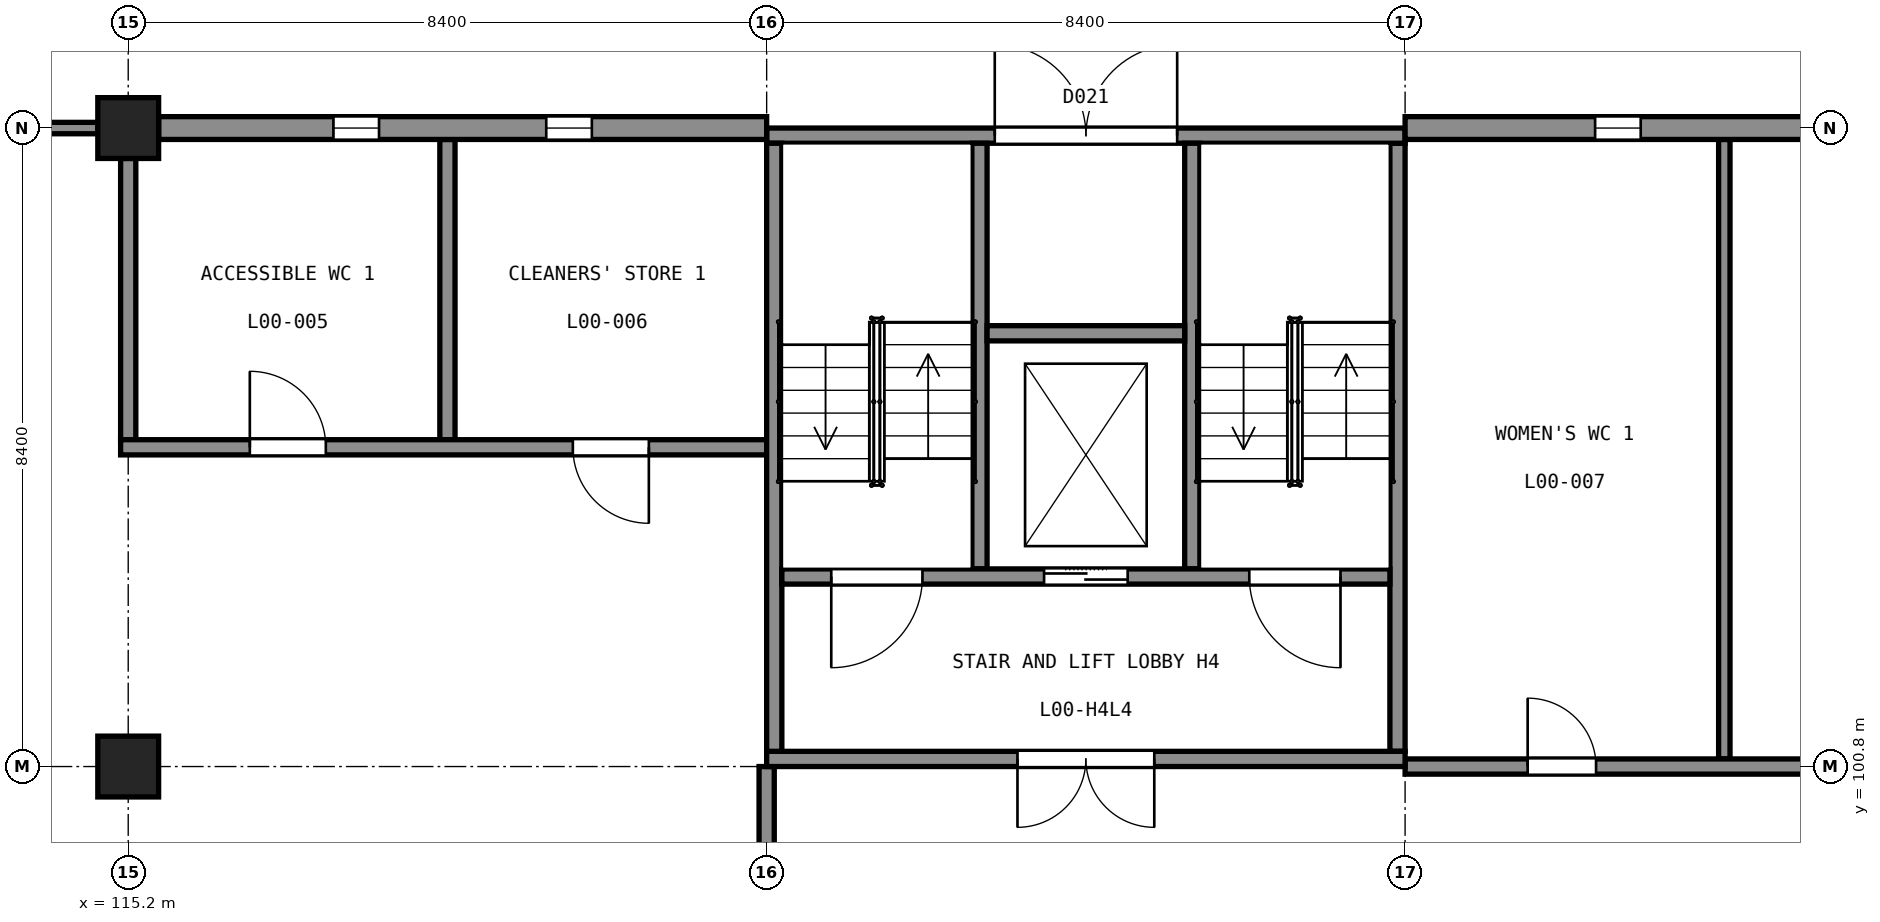
"""IFC4 building model, lengths in metres.
Left out: names, types, materials, properties, quantities, classifications, styles, units other than length and angle.
Written with IfcOpenShell. Run it as: python <this file> out.ifc"""

import sys

from ifc_helpers import new_model, si_unit, direction, frame, frame_2d, origin, origin_2d, place, context, subcontext, project, spatial, rectangle, extrude, element, fill, save


model = new_model("IFC4")
c1 = context("Model", 3, precision=1e-05, world=origin(), true_north=direction((0.0, 1.0)))
c2 = subcontext(c1, "Body", "Model", "MODEL_VIEW")
j1 = project(units=[si_unit("LENGTHUNIT", "METRE"), si_unit("PLANEANGLEUNIT", "RADIAN")], contexts=[c1])
p1 = place(None, origin())
s1 = spatial("IfcSite", under=j1, at=p1, CompositionType="ELEMENT")
p2 = place(p1, origin())
s2 = spatial("IfcBuilding", under=s1, at=p2, CompositionType="ELEMENT")
p3 = place(p2, origin())
s3 = spatial("IfcBuildingStorey", under=s2, at=p3, CompositionType="ELEMENT", Elevation=0.0)
p4 = place(p3, frame((123.6, 100.9, -1.8), z_axis=(0.0, 0.0, 1.0), x_axis=(1.0, 0.0, 0.0)))
e1 = element("IfcWall", 1, at=p4, inside=s3, PredefinedType="SHEAR", context=c2, shape_type="SweptSolid", body=[
    extrude(rectangle(XDim=8.4, YDim=0.2, at=frame_2d((4.2, 0.0))), origin(), (0.0, 0.0, 1.0), 7.3),
])
p5 = place(p4, frame((3.3, 0.0, 1.8)))
e2 = element("IfcOpeningElement", 2, at=p5, cuts=e1, PredefinedType="OPENING", context=c2, shape_type="SweptSolid", body=[
    extrude(rectangle(XDim=1.8, YDim=2.1, at=frame_2d((0.9, 1.05))), frame((0.0, 0.11, 0.0), z_axis=(0.0, -1.0, 0.0), x_axis=(1.0, 0.0, 0.0)), (0.0, 0.0, 1.0), 0.22),
])
p6 = place(p3, frame((123.6, 109.1, -1.8), z_axis=(0.0, 0.0, 1.0), x_axis=(1.0, 0.0, 0.0)))
e3 = element("IfcWall", 3, at=p6, inside=s3, PredefinedType="SHEAR", context=c2, shape_type="SweptSolid", body=[
    extrude(rectangle(XDim=8.4, YDim=0.2, at=frame_2d((4.2, 0.0))), origin(), (0.0, 0.0, 1.0), 7.3),
])
p7 = place(p6, frame((3.001, 0.0, 1.8)))
e4 = element("IfcOpeningElement", 4, at=p7, cuts=e3, PredefinedType="OPENING", context=c2, shape_type="SweptSolid", body=[
    extrude(rectangle(XDim=2.4, YDim=2.1, at=frame_2d((1.2, 1.05))), frame((0.0, 0.11, 0.0), z_axis=(0.0, -1.0, 0.0), x_axis=(1.0, 0.0, 0.0)), (0.0, 0.0, 1.0), 0.22),
])
for number, where, z_axis, x_axis in (
    (5, (123.7, 101.0, -1.8), (0.0, 0.0, 1.0), (0.0, 1.0, 0.0)),
    (6, (131.9, 101.0, -1.8), (0.0, 0.0, 1.0), (0.0, 1.0, 0.0)),
):
    element("IfcWall", number, at=place(p3, frame(where, z_axis=z_axis, x_axis=x_axis)), inside=s3, PredefinedType="SHEAR", context=c2, shape_type="SweptSolid", body=[
        extrude(rectangle(XDim=8.0, YDim=0.2, at=frame_2d((4.0, 0.0))), origin(), (0.0, 0.0, 1.0), 7.3),
    ])
p8 = place(p3, frame((123.8, 103.3, -1.8), z_axis=(0.0, 0.0, 1.0), x_axis=(1.0, 0.0, 0.0)))
e7 = element("IfcWall", 7, at=p8, inside=s3, PredefinedType="SHEAR", context=c2, shape_type="SweptSolid", body=[
    extrude(rectangle(XDim=8.0, YDim=0.2, at=frame_2d((4.0, 0.0))), origin(), (0.0, 0.0, 1.0), 7.3),
])
p9 = place(p8, frame((0.65, 0.0, 1.8)))
e8 = element("IfcOpeningElement", 8, at=p9, cuts=e7, PredefinedType="OPENING", context=c2, shape_type="SweptSolid", body=[
    extrude(rectangle(XDim=1.2, YDim=2.1, at=frame_2d((0.6, 1.05))), frame((0.0, 0.11, 0.0), z_axis=(0.0, -1.0, 0.0), x_axis=(1.0, 0.0, 0.0)), (0.0, 0.0, 1.0), 0.22),
])
p10 = place(p8, frame((6.15, 0.0, 1.8)))
e9 = element("IfcOpeningElement", 9, at=p10, cuts=e7, PredefinedType="OPENING", context=c2, shape_type="SweptSolid", body=[
    extrude(rectangle(XDim=1.2, YDim=2.1, at=frame_2d((0.6, 1.05))), frame((0.0, 0.11, 0.0), z_axis=(0.0, -1.0, 0.0), x_axis=(1.0, 0.0, 0.0)), (0.0, 0.0, 1.0), 0.22),
])
p11 = place(p8, frame((3.45, 0.0, 1.8)))
e10 = element("IfcOpeningElement", 10, at=p11, cuts=e7, PredefinedType="OPENING", context=c2, shape_type="SweptSolid", body=[
    extrude(rectangle(XDim=1.1, YDim=2.1, at=frame_2d((0.55, 1.05))), frame((0.0, 0.11, 0.0), z_axis=(0.0, -1.0, 0.0), x_axis=(1.0, 0.0, 0.0)), (0.0, 0.0, 1.0), 0.22),
])
for number, where, z_axis, x_axis in (
    (11, (126.4, 103.4, -1.8), (0.0, 0.0, 1.0), (0.0, 1.0, 0.0)),
    (12, (129.2, 103.4, -1.8), (0.0, 0.0, 1.0), (0.0, 1.0, 0.0)),
):
    element("IfcWall", number, at=place(p3, frame(where, z_axis=z_axis, x_axis=x_axis)), inside=s3, PredefinedType="SHEAR", context=c2, shape_type="SweptSolid", body=[
        extrude(rectangle(XDim=5.6, YDim=0.2, at=frame_2d((2.8, 0.0))), origin(), (0.0, 0.0, 1.0), 7.3),
    ])
p12 = place(p3, frame((126.5, 106.5, -1.8), z_axis=(0.0, 0.0, 1.0), x_axis=(1.0, 0.0, 0.0)))
e13 = element("IfcWall", 13, at=p12, inside=s3, PredefinedType="SHEAR", context=c2, shape_type="SweptSolid", body=[
    extrude(rectangle(XDim=2.6, YDim=0.2, at=frame_2d((1.3, 0.0))), origin(), (0.0, 0.0, 1.0), 7.3),
])
for number, where, z_axis, x_axis in (
    (14, (115.2, 100.8, -0.3), (0.0, 0.0, 1.0), (1.0, 0.0, 0.0)),
    (15, (115.2, 109.2, -0.3), (0.0, 0.0, 1.0), (1.0, 0.0, 0.0)),
):
    element("IfcColumn", number, at=place(p3, frame(where, z_axis=z_axis, x_axis=x_axis)), inside=s3, PredefinedType="COLUMN", context=c2, shape_type="SweptSolid", body=[
        extrude(rectangle(XDim=0.8, YDim=0.8, at=origin_2d()), origin(), (0.0, 0.0, 1.0), 5.8),
    ])
p13 = place(p3, frame((132.0, 109.2, 0.0), z_axis=(0.0, 0.0, 1.0), x_axis=(1.0, 0.0, 0.0)))
e16 = element("IfcWall", 16, at=p13, inside=s3, PredefinedType="SOLIDWALL", context=c2, shape_type="SweptSolid", body=[
    extrude(rectangle(XDim=8.4, YDim=0.3, at=frame_2d((4.2, 0.0))), origin(), (0.0, 0.0, 1.0), 4.44),
])
p14 = place(p13, frame((2.5, 0.0, 1.5)))
e17 = element("IfcOpeningElement", 17, at=p14, cuts=e16, PredefinedType="OPENING", context=c2, shape_type="SweptSolid", body=[
    extrude(rectangle(XDim=0.6, YDim=2.4, at=frame_2d((0.3, 1.2))), frame((0.0, 0.16, 0.0), z_axis=(0.0, -1.0, 0.0), x_axis=(1.0, 0.0, 0.0)), (0.0, 0.0, 1.0), 0.32),
])
p15 = place(p13, frame((5.3, 0.0, 1.5)))
e18 = element("IfcOpeningElement", 18, at=p15, cuts=e16, PredefinedType="OPENING", context=c2, shape_type="SweptSolid", body=[
    extrude(rectangle(XDim=0.6, YDim=2.4, at=frame_2d((0.3, 1.2))), frame((0.0, 0.16, 0.0), z_axis=(0.0, -1.0, 0.0), x_axis=(1.0, 0.0, 0.0)), (0.0, 0.0, 1.0), 0.32),
])
p16 = place(p3, frame((115.6, 109.2, 0.0), z_axis=(0.0, 0.0, 1.0), x_axis=(1.0, 0.0, 0.0)))
e19 = element("IfcWall", 19, at=p16, inside=s3, PredefinedType="SOLIDWALL", context=c2, shape_type="SweptSolid", body=[
    extrude(rectangle(XDim=8.0, YDim=0.3, at=frame_2d((4.0, 0.0))), origin(), (0.0, 0.0, 1.0), 4.44),
])
p17 = place(p16, frame((2.3, 0.0, 1.5)))
e20 = element("IfcOpeningElement", 20, at=p17, cuts=e19, PredefinedType="OPENING", context=c2, shape_type="SweptSolid", body=[
    extrude(rectangle(XDim=0.6, YDim=2.4, at=frame_2d((0.3, 1.2))), frame((0.0, 0.16, 0.0), z_axis=(0.0, -1.0, 0.0), x_axis=(1.0, 0.0, 0.0)), (0.0, 0.0, 1.0), 0.32),
])
p18 = place(p16, frame((5.1, 0.0, 1.5)))
e21 = element("IfcOpeningElement", 21, at=p18, cuts=e19, PredefinedType="OPENING", context=c2, shape_type="SweptSolid", body=[
    extrude(rectangle(XDim=0.6, YDim=2.4, at=frame_2d((0.3, 1.2))), frame((0.0, 0.16, 0.0), z_axis=(0.0, -1.0, 0.0), x_axis=(1.0, 0.0, 0.0)), (0.0, 0.0, 1.0), 0.32),
])
p19 = place(p3, frame((107.2, 109.2, 0.0), z_axis=(0.0, 0.0, 1.0), x_axis=(1.0, 0.0, 0.0)))
e22 = element("IfcWall", 22, at=p19, inside=s3, PredefinedType="ELEMENTEDWALL", context=c2, shape_type="SweptSolid", body=[
    extrude(rectangle(XDim=7.6, YDim=0.15, at=frame_2d((3.8, 0.0))), origin(), (0.0, 0.0, 1.0), 4.44),
])
p20 = place(p19, frame((0.8, 0.0, 0.0)))
e23 = element("IfcOpeningElement", 23, at=p20, cuts=e22, PredefinedType="OPENING", context=c2, shape_type="SweptSolid", body=[
    extrude(rectangle(XDim=2.0, YDim=2.4, at=frame_2d((1.0, 1.2))), frame((0.0, 0.085, 0.0), z_axis=(0.0, -1.0, 0.0), x_axis=(1.0, 0.0, 0.0)), (0.0, 0.0, 1.0), 0.17),
])
p21 = place(p19, frame((0.8, 0.0, 2.6)))
e24 = element("IfcOpeningElement", 24, at=p21, cuts=e22, PredefinedType="OPENING", context=c2, shape_type="SweptSolid", body=[
    extrude(rectangle(XDim=2.0, YDim=1.74, at=frame_2d((1.0, 0.87))), frame((0.0, 0.085, 0.0), z_axis=(0.0, -1.0, 0.0), x_axis=(1.0, 0.0, 0.0)), (0.0, 0.0, 1.0), 0.17),
])
p22 = place(p19, frame((2.8, 0.0, 0.0)))
e25 = element("IfcOpeningElement", 25, at=p22, cuts=e22, PredefinedType="OPENING", context=c2, shape_type="SweptSolid", body=[
    extrude(rectangle(XDim=2.0, YDim=2.4, at=frame_2d((1.0, 1.2))), frame((0.0, 0.085, 0.0), z_axis=(0.0, -1.0, 0.0), x_axis=(1.0, 0.0, 0.0)), (0.0, 0.0, 1.0), 0.17),
])
p23 = place(p19, frame((2.8, 0.0, 2.6)))
e26 = element("IfcOpeningElement", 26, at=p23, cuts=e22, PredefinedType="OPENING", context=c2, shape_type="SweptSolid", body=[
    extrude(rectangle(XDim=2.0, YDim=1.74, at=frame_2d((1.0, 0.87))), frame((0.0, 0.085, 0.0), z_axis=(0.0, -1.0, 0.0), x_axis=(1.0, 0.0, 0.0)), (0.0, 0.0, 1.0), 0.17),
])
p24 = place(p19, frame((4.8, 0.0, 0.0)))
e27 = element("IfcOpeningElement", 27, at=p24, cuts=e22, PredefinedType="OPENING", context=c2, shape_type="SweptSolid", body=[
    extrude(rectangle(XDim=2.0, YDim=2.4, at=frame_2d((1.0, 1.2))), frame((0.0, 0.085, 0.0), z_axis=(0.0, -1.0, 0.0), x_axis=(1.0, 0.0, 0.0)), (0.0, 0.0, 1.0), 0.17),
])
p25 = place(p19, frame((4.8, 0.0, 2.6)))
e28 = element("IfcOpeningElement", 28, at=p25, cuts=e22, PredefinedType="OPENING", context=c2, shape_type="SweptSolid", body=[
    extrude(rectangle(XDim=2.0, YDim=1.74, at=frame_2d((1.0, 0.87))), frame((0.0, 0.085, 0.0), z_axis=(0.0, -1.0, 0.0), x_axis=(1.0, 0.0, 0.0)), (0.0, 0.0, 1.0), 0.17),
])
p26 = place(p3, frame((119.4, 105.1, 0.0), z_axis=(0.0, 0.0, 1.0), x_axis=(0.0, 1.0, 0.0)))
e29 = element("IfcWall", 29, at=p26, inside=s3, PredefinedType="PARTITIONING", context=c2, shape_type="SweptSolid", body=[
    extrude(rectangle(XDim=3.95, YDim=0.2, at=frame_2d((1.975, 0.0))), origin(), (0.0, 0.0, 1.0), 4.4),
])
p27 = place(p3, frame((115.2, 105.1, 0.0), z_axis=(0.0, 0.0, 1.0), x_axis=(0.0, 1.0, 0.0)))
e30 = element("IfcWall", 30, at=p27, inside=s3, PredefinedType="PARTITIONING", context=c2, shape_type="SweptSolid", body=[
    extrude(rectangle(XDim=3.7, YDim=0.2, at=frame_2d((1.85, 0.0))), origin(), (0.0, 0.0, 1.0), 4.4),
])
p28 = place(p3, frame((115.1, 105.0, 0.0), z_axis=(0.0, 0.0, 1.0), x_axis=(1.0, 0.0, 0.0)))
e31 = element("IfcWall", 31, at=p28, inside=s3, PredefinedType="PARTITIONING", context=c2, shape_type="SweptSolid", body=[
    extrude(rectangle(XDim=8.5, YDim=0.2, at=frame_2d((4.25, 0.0))), origin(), (0.0, 0.0, 1.0), 4.4),
])
p29 = place(p28, frame((1.7, 0.0, 0.0)))
e32 = element("IfcOpeningElement", 32, at=p29, cuts=e31, PredefinedType="OPENING", context=c2, shape_type="SweptSolid", body=[
    extrude(rectangle(XDim=1.0, YDim=2.1, at=frame_2d((0.5, 1.05))), frame((0.0, 0.11, 0.0), z_axis=(0.0, -1.0, 0.0), x_axis=(1.0, 0.0, 0.0)), (0.0, 0.0, 1.0), 0.22),
])
p30 = place(p28, frame((5.95, 0.0, 0.0)))
e33 = element("IfcOpeningElement", 33, at=p30, cuts=e31, PredefinedType="OPENING", context=c2, shape_type="SweptSolid", body=[
    extrude(rectangle(XDim=1.0, YDim=2.1, at=frame_2d((0.5, 1.05))), frame((0.0, 0.11, 0.0), z_axis=(0.0, -1.0, 0.0), x_axis=(1.0, 0.0, 0.0)), (0.0, 0.0, 1.0), 0.22),
])
p31 = place(p3, frame((136.2, 100.9, 0.0), z_axis=(0.0, 0.0, 1.0), x_axis=(0.0, 1.0, 0.0)))
e34 = element("IfcWall", 34, at=p31, inside=s3, PredefinedType="PARTITIONING", context=c2, shape_type="SweptSolid", body=[
    extrude(rectangle(XDim=8.15, YDim=0.15, at=frame_2d((4.075, 0.0))), origin(), (0.0, 0.0, 1.0), 4.4),
])
p32 = place(p3, frame((132.0, 100.8, 0.0), z_axis=(0.0, 0.0, 1.0), x_axis=(1.0, 0.0, 0.0)))
e35 = element("IfcWall", 35, at=p32, inside=s3, PredefinedType="PARTITIONING", context=c2, shape_type="SweptSolid", body=[
    extrude(rectangle(XDim=8.4, YDim=0.2, at=frame_2d((4.2, 0.0))), origin(), (0.0, 0.0, 1.0), 4.4),
])
p33 = place(p32, frame((1.613, 0.0, 0.0)))
e36 = element("IfcOpeningElement", 36, at=p33, cuts=e35, PredefinedType="OPENING", context=c2, shape_type="SweptSolid", body=[
    extrude(rectangle(XDim=0.9, YDim=2.1, at=frame_2d((0.45, 1.05))), frame((0.0, 0.11, 0.0), z_axis=(0.0, -1.0, 0.0), x_axis=(1.0, 0.0, 0.0)), (0.0, 0.0, 1.0), 0.22),
])
p34 = place(p32, frame((5.887, 0.0, 0.0)))
e37 = element("IfcOpeningElement", 37, at=p34, cuts=e35, PredefinedType="OPENING", context=c2, shape_type="SweptSolid", body=[
    extrude(rectangle(XDim=0.9, YDim=2.1, at=frame_2d((0.45, 1.05))), frame((0.0, 0.11, 0.0), z_axis=(0.0, -1.0, 0.0), x_axis=(1.0, 0.0, 0.0)), (0.0, 0.0, 1.0), 0.22),
])
p35 = place(p3, frame((123.6, 92.8, 0.0), z_axis=(0.0, 0.0, 1.0), x_axis=(0.0, 1.0, 0.0)))
e38 = element("IfcWall", 38, at=p35, inside=s3, PredefinedType="PARTITIONING", context=c2, shape_type="SweptSolid", body=[
    extrude(rectangle(XDim=8.0, YDim=0.2, at=frame_2d((4.0, 0.0))), origin(), (0.0, 0.0, 1.0), 4.4),
])
p36 = place(p35, frame((4.575, 0.0, 0.0)))
e39 = element("IfcOpeningElement", 39, at=p36, cuts=e38, PredefinedType="OPENING", context=c2, shape_type="SweptSolid", body=[
    extrude(rectangle(XDim=2.4, YDim=2.4, at=frame_2d((1.2, 1.2))), frame((0.0, 0.11, 0.0), z_axis=(0.0, -1.0, 0.0), x_axis=(1.0, 0.0, 0.0)), (0.0, 0.0, 1.0), 0.22),
])
p37 = place(p14, origin())
e40 = element("IfcWindow", 40, at=p37, inside=s3, PartitioningType="SINGLE_PANEL", PredefinedType="WINDOW", context=c2, shape_type="SweptSolid", body=[
    extrude(rectangle(XDim=0.6, YDim=2.4, at=frame_2d((0.3, 1.2))), frame((0.0, -0.07, 0.0), z_axis=(0.0, -1.0, 0.0), x_axis=(1.0, 0.0, 0.0)), (0.0, 0.0, 1.0), 0.06),
])
fill(e17, e40)
p38 = place(p17, origin())
e41 = element("IfcWindow", 41, at=p38, inside=s3, PartitioningType="SINGLE_PANEL", PredefinedType="WINDOW", context=c2, shape_type="SweptSolid", body=[
    extrude(rectangle(XDim=0.6, YDim=2.4, at=frame_2d((0.3, 1.2))), frame((0.0, -0.07, 0.0), z_axis=(0.0, -1.0, 0.0), x_axis=(1.0, 0.0, 0.0)), (0.0, 0.0, 1.0), 0.06),
])
fill(e20, e41)
p39 = place(p18, origin())
e42 = element("IfcWindow", 42, at=p39, inside=s3, PartitioningType="SINGLE_PANEL", PredefinedType="WINDOW", context=c2, shape_type="SweptSolid", body=[
    extrude(rectangle(XDim=0.6, YDim=2.4, at=frame_2d((0.3, 1.2))), frame((0.0, -0.07, 0.0), z_axis=(0.0, -1.0, 0.0), x_axis=(1.0, 0.0, 0.0)), (0.0, 0.0, 1.0), 0.06),
])
fill(e21, e42)
p40 = place(p7, origin())
e43 = element("IfcDoor", 43, at=p40, inside=s3, OperationType="DOUBLE_DOOR_SINGLE_SWING", PredefinedType="DOOR", context=c2, shape_type="SweptSolid", body=[
    extrude(rectangle(XDim=2.4, YDim=2.1, at=frame_2d((1.2, 1.05))), frame((0.0, 0.025, 0.0), z_axis=(0.0, -1.0, 0.0), x_axis=(1.0, 0.0, 0.0)), (0.0, 0.0, 1.0), 0.05),
])
fill(e4, e43)
p41 = place(p29, origin())
e44 = element("IfcDoor", 44, at=p41, inside=s3, OperationType="SINGLE_SWING_RIGHT", PredefinedType="DOOR", context=c2, shape_type="SweptSolid", body=[
    extrude(rectangle(XDim=1.0, YDim=2.1, at=frame_2d((0.5, 1.05))), frame((0.0, 0.025, 0.0), z_axis=(0.0, -1.0, 0.0), x_axis=(1.0, 0.0, 0.0)), (0.0, 0.0, 1.0), 0.05),
])
fill(e32, e44)
p42 = place(p30, origin())
e45 = element("IfcDoor", 45, at=p42, inside=s3, OperationType="SINGLE_SWING_RIGHT", PredefinedType="DOOR", context=c2, shape_type="SweptSolid", body=[
    extrude(rectangle(XDim=1.0, YDim=2.1, at=frame_2d((0.5, 1.05))), frame((0.0, 0.025, 0.0), z_axis=(0.0, -1.0, 0.0), x_axis=(1.0, 0.0, 0.0)), (0.0, 0.0, 1.0), 0.05),
])
fill(e33, e45)
p43 = place(p33, origin())
e46 = element("IfcDoor", 46, at=p43, inside=s3, OperationType="SINGLE_SWING_RIGHT", PredefinedType="DOOR", context=c2, shape_type="SweptSolid", body=[
    extrude(rectangle(XDim=0.9, YDim=2.1, at=frame_2d((0.45, 1.05))), frame((0.0, 0.025, 0.0), z_axis=(0.0, -1.0, 0.0), x_axis=(1.0, 0.0, 0.0)), (0.0, 0.0, 1.0), 0.05),
])
fill(e36, e46)
p44 = place(p5, origin())
e47 = element("IfcDoor", 47, at=p44, inside=s3, OperationType="DOUBLE_DOOR_SINGLE_SWING", PredefinedType="DOOR", context=c2, shape_type="SweptSolid", body=[
    extrude(rectangle(XDim=1.8, YDim=2.1, at=frame_2d((0.9, 1.05))), frame((0.0, 0.025, 0.0), z_axis=(0.0, -1.0, 0.0), x_axis=(1.0, 0.0, 0.0)), (0.0, 0.0, 1.0), 0.05),
])
fill(e2, e47)
p45 = place(p9, origin())
e48 = element("IfcDoor", 48, at=p45, inside=s3, OperationType="SINGLE_SWING_LEFT", PredefinedType="DOOR", context=c2, shape_type="SweptSolid", body=[
    extrude(rectangle(XDim=1.2, YDim=2.1, at=frame_2d((0.6, 1.05))), frame((0.0, 0.025, 0.0), z_axis=(0.0, -1.0, 0.0), x_axis=(1.0, 0.0, 0.0)), (0.0, 0.0, 1.0), 0.05),
])
fill(e8, e48)
p46 = place(p10, origin())
e49 = element("IfcDoor", 49, at=p46, inside=s3, OperationType="SINGLE_SWING_RIGHT", PredefinedType="DOOR", context=c2, shape_type="SweptSolid", body=[
    extrude(rectangle(XDim=1.2, YDim=2.1, at=frame_2d((0.6, 1.05))), frame((0.0, 0.025, 0.0), z_axis=(0.0, -1.0, 0.0), x_axis=(1.0, 0.0, 0.0)), (0.0, 0.0, 1.0), 0.05),
])
fill(e9, e49)
p47 = place(p11, origin())
e50 = element("IfcDoor", 50, at=p47, inside=s3, OperationType="DOUBLE_DOOR_SLIDING", PredefinedType="DOOR", context=c2, shape_type="SweptSolid", body=[
    extrude(rectangle(XDim=1.1, YDim=2.1, at=frame_2d((0.55, 1.05))), frame((0.0, 0.025, 0.0), z_axis=(0.0, -1.0, 0.0), x_axis=(1.0, 0.0, 0.0)), (0.0, 0.0, 1.0), 0.05),
])
fill(e10, e50)
save(model, sys.argv[1])
